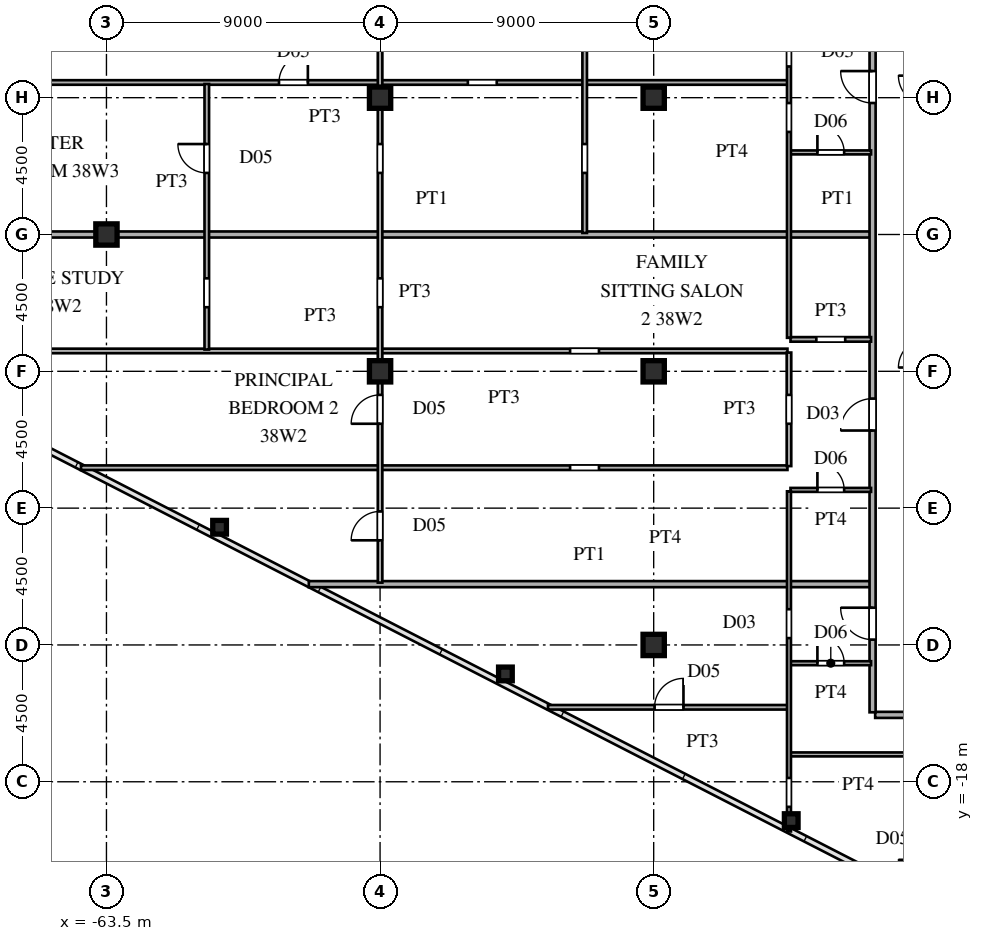
"""IFC4 building model, lengths in metres.
Left out: names, types, materials, properties, quantities, classifications, styles, units other than length and angle.
Written with IfcOpenShell. Run it as: python <this file> out.ifc"""

import sys

from ifc_helpers import new_model, si_unit, direction, frame, frame_2d, origin, origin_2d, place, context, subcontext, project, spatial, rectangle, hollow_rectangle, i_section, extrude, source, transform, mapped, element, fill, save


model = new_model("IFC4")
c1 = context("Model", 3, precision=1e-05, world=origin(), true_north=direction((0.0, 1.0)))
c2 = subcontext(c1, "Body", "Model", "MODEL_VIEW")
j1 = project(units=[si_unit("LENGTHUNIT", "METRE"), si_unit("PLANEANGLEUNIT", "RADIAN")], contexts=[c1])
p1 = place(None, origin())
s1 = spatial("IfcSite", under=j1, at=p1, CompositionType="ELEMENT")
p2 = place(p1, origin())
s2 = spatial("IfcBuilding", under=s1, at=p2, CompositionType="ELEMENT")
p3 = place(p2, frame((0.0, 0.0, 144.0)))
s3 = spatial("IfcBuildingStorey", under=s2, at=p3, CompositionType="ELEMENT", Elevation=144.0)
m1 = source(origin(), c2, "Body", "SweptSolid", [
    extrude(i_section(OverallWidth=0.7, OverallDepth=0.7, WebThickness=0.028, FlangeThickness=0.045, at=origin_2d()), origin(), (0.0, 0.0, 1.0), 3.6),
])
for number, where, z_axis, x_axis in (
    (1, (-45.5, -13.5, 0.0), (0.0, 0.0, 1.0), (1.0, 0.0, 0.0)),
    (2, (-45.5, -4.5, 0.0), (0.0, 0.0, 1.0), (1.0, 0.0, 0.0)),
    (3, (-45.5, 4.5, 0.0), (0.0, 0.0, 1.0), (1.0, 0.0, 0.0)),
    (4, (-54.5, -4.5, 0.0), (0.0, 0.0, 1.0), (1.0, 0.0, 0.0)),
    (5, (-54.5, 4.5, 0.0), (0.0, 0.0, 1.0), (1.0, 0.0, 0.0)),
    (6, (-63.5, 0.0, 0.0), (0.0, 0.0, 1.0), (1.0, 0.0, 0.0)),
):
    element("IfcColumn", number, at=place(p3, frame(where, z_axis=z_axis, x_axis=x_axis)), inside=s3, PredefinedType="COLUMN", context=c2, shape_type="MappedRepresentation", body=[
        mapped(m1, transform((0.0, 0.0, 0.0), scale=1.0)),
    ])
m2 = source(origin(), c2, "Body", "SweptSolid", [
    extrude(hollow_rectangle(XDim=0.45, YDim=0.45, WallThickness=0.018, at=origin_2d()), origin(), (0.0, 0.0, 1.0), 3.6),
])
for number, where, z_axis, x_axis in (
    (7, (-40.976, -19.278, 0.0), (0.0, 0.0, 1.0), (1.0, 0.0, 0.0)),
    (8, (-50.377, -14.453, 0.0), (0.0, 0.0, 1.0), (1.0, 0.0, 0.0)),
    (9, (-59.779, -9.629, 0.0), (0.0, 0.0, 1.0), (1.0, 0.0, 0.0)),
):
    element("IfcColumn", number, at=place(p3, frame(where, z_axis=z_axis, x_axis=x_axis)), inside=s3, PredefinedType="COLUMN", context=c2, shape_type="MappedRepresentation", body=[
        mapped(m2, transform((0.0, 0.0, 0.0), scale=1.0)),
    ])
p4 = place(p3, frame((-41.0, -17.1, 0.0), z_axis=(0.0, 0.0, 1.0), x_axis=(1.0, 0.0, 0.0)))
e10 = element("IfcWall", 10, at=p4, inside=s3, PredefinedType="PARTITIONING", context=c2, shape_type="SweptSolid", body=[
    extrude(rectangle(XDim=4.45, YDim=0.13, at=frame_2d((2.225, 0.0))), origin(), (0.0, 0.0, 1.0), 3.38),
])
p5 = place(p3, frame((-38.215, -15.8, 0.0), z_axis=(0.0, 0.0, 1.0), x_axis=(1.0, 0.0, 0.0)))
e11 = element("IfcWall", 11, at=p5, inside=s3, PredefinedType="PARTITIONING", context=c2, shape_type="SweptSolid", body=[
    extrude(rectangle(XDim=10.715, YDim=0.2, at=frame_2d((5.357, 0.0))), origin(), (0.0, 0.0, 1.0), 3.38),
])
p6 = place(p3, frame((-48.977, -15.55, 0.0), z_axis=(0.0, 0.0, 1.0), x_axis=(1.0, 0.0, 0.0)))
e12 = element("IfcWall", 12, at=p6, inside=s3, PredefinedType="PARTITIONING", context=c2, shape_type="SweptSolid", body=[
    extrude(rectangle(XDim=7.877, YDim=0.15, at=frame_2d((3.938, 0.0))), origin(), (0.0, 0.0, 1.0), 3.38),
])
p7 = place(p6, frame((3.506, 0.0, 0.0)))
e13 = element("IfcOpeningElement", 13, at=p7, cuts=e12, PredefinedType="OPENING", context=c2, shape_type="SweptSolid", body=[
    extrude(rectangle(XDim=0.95, YDim=2.15, at=frame_2d((0.475, 1.075))), frame((0.0, 0.085, 0.0), z_axis=(0.0, -1.0, 0.0), x_axis=(1.0, 0.0, 0.0)), (0.0, 0.0, 1.0), 0.17),
])
p8 = place(p3, frame((-41.0, -14.1, 0.0), z_axis=(0.0, 0.0, 1.0), x_axis=(1.0, 0.0, 0.0)))
e14 = element("IfcWall", 14, at=p8, inside=s3, PredefinedType="PARTITIONING", context=c2, shape_type="SweptSolid", body=[
    extrude(rectangle(XDim=2.65, YDim=0.13, at=frame_2d((1.325, 0.0))), origin(), (0.0, 0.0, 1.0), 3.38),
])
p9 = place(p8, frame((0.885, 0.0, 0.0)))
e15 = element("IfcOpeningElement", 15, at=p9, cuts=e14, PredefinedType="OPENING", context=c2, shape_type="SweptSolid", body=[
    extrude(rectangle(XDim=0.88, YDim=2.1, at=frame_2d((0.44, 1.05))), frame((0.0, 0.075, 0.0), z_axis=(0.0, -1.0, 0.0), x_axis=(1.0, 0.0, 0.0)), (0.0, 0.0, 1.0), 0.15),
])
p10 = place(p3, frame((-56.844, -11.5, 0.0), z_axis=(0.0, 0.0, 1.0), x_axis=(1.0, 0.0, 0.0)))
e16 = element("IfcWall", 16, at=p10, inside=s3, PredefinedType="PARTITIONING", context=c2, shape_type="SweptSolid", body=[
    extrude(rectangle(XDim=18.464, YDim=0.2, at=frame_2d((9.232, 0.0))), origin(), (0.0, 0.0, 1.0), 3.38),
])
p11 = place(p3, frame((-41.0, -8.4, 0.0), z_axis=(0.0, 0.0, 1.0), x_axis=(1.0, 0.0, 0.0)))
e17 = element("IfcWall", 17, at=p11, inside=s3, PredefinedType="PARTITIONING", context=c2, shape_type="SweptSolid", body=[
    extrude(rectangle(XDim=2.65, YDim=0.13, at=frame_2d((1.325, 0.0))), origin(), (0.0, 0.0, 1.0), 3.38),
])
p12 = place(p11, frame((0.885, 0.0, 0.0)))
e18 = element("IfcOpeningElement", 18, at=p12, cuts=e17, PredefinedType="OPENING", context=c2, shape_type="SweptSolid", body=[
    extrude(rectangle(XDim=0.88, YDim=2.1, at=frame_2d((0.44, 1.05))), frame((0.0, 0.075, 0.0), z_axis=(0.0, -1.0, 0.0), x_axis=(1.0, 0.0, 0.0)), (0.0, 0.0, 1.0), 0.15),
])
p13 = place(p3, frame((-64.338, -7.67, 0.0), z_axis=(0.0, 0.0, 1.0), x_axis=(1.0, 0.0, 0.0)))
e19 = element("IfcWall", 19, at=p13, inside=s3, PredefinedType="PARTITIONING", context=c2, shape_type="SweptSolid", body=[
    extrude(rectangle(XDim=23.238, YDim=0.15, at=frame_2d((11.619, 0.0))), origin(), (0.0, 0.0, 1.0), 3.38),
])
p14 = place(p13, frame((16.088, 0.0, 0.0)))
e20 = element("IfcOpeningElement", 20, at=p14, cuts=e19, PredefinedType="OPENING", context=c2, shape_type="SweptSolid", body=[
    extrude(rectangle(XDim=0.95, YDim=2.15, at=frame_2d((0.475, 1.075))), frame((0.0, 0.085, 0.0), z_axis=(0.0, -1.0, 0.0), x_axis=(1.0, 0.0, 0.0)), (0.0, 0.0, 1.0), 0.17),
])
p15 = place(p3, frame((-69.535, -3.83, 0.0), z_axis=(0.0, 0.0, 1.0), x_axis=(1.0, 0.0, 0.0)))
e21 = element("IfcWall", 21, at=p15, inside=s3, PredefinedType="PARTITIONING", context=c2, shape_type="SweptSolid", body=[
    extrude(rectangle(XDim=28.435, YDim=0.15, at=frame_2d((14.217, 0.0))), origin(), (0.0, 0.0, 1.0), 3.38),
])
p16 = place(p15, frame((21.285, 0.0, 0.0)))
e22 = element("IfcOpeningElement", 22, at=p16, cuts=e21, PredefinedType="OPENING", context=c2, shape_type="SweptSolid", body=[
    extrude(rectangle(XDim=0.95, YDim=2.15, at=frame_2d((0.475, 1.075))), frame((0.0, 0.085, 0.0), z_axis=(0.0, -1.0, 0.0), x_axis=(1.0, 0.0, 0.0)), (0.0, 0.0, 1.0), 0.17),
])
p17 = place(p3, frame((-41.0, -3.45, 0.0), z_axis=(0.0, 0.0, 1.0), x_axis=(1.0, 0.0, 0.0)))
e23 = element("IfcWall", 23, at=p17, inside=s3, PredefinedType="PARTITIONING", context=c2, shape_type="SweptSolid", body=[
    extrude(rectangle(XDim=2.65, YDim=0.15, at=frame_2d((1.325, 0.0))), origin(), (0.0, 0.0, 1.0), 3.38),
])
p18 = place(p17, frame((0.85, 0.0, 0.0)))
e24 = element("IfcOpeningElement", 24, at=p18, cuts=e23, PredefinedType="OPENING", context=c2, shape_type="SweptSolid", body=[
    extrude(rectangle(XDim=0.95, YDim=2.15, at=frame_2d((0.475, 1.075))), frame((0.0, 0.085, 0.0), z_axis=(0.0, -1.0, 0.0), x_axis=(1.0, 0.0, 0.0)), (0.0, 0.0, 1.0), 0.17),
])
p19 = place(p3, frame((-69.505, 0.0, 0.0), z_axis=(0.0, 0.0, 1.0), x_axis=(1.0, 0.0, 0.0)))
e25 = element("IfcWall", 25, at=p19, inside=s3, PredefinedType="PARTITIONING", context=c2, shape_type="SweptSolid", body=[
    extrude(rectangle(XDim=31.125, YDim=0.2, at=frame_2d((15.562, 0.0))), origin(), (0.0, 0.0, 1.0), 3.38),
])
p20 = place(p3, frame((-41.0, 2.7, 0.0), z_axis=(0.0, 0.0, 1.0), x_axis=(1.0, 0.0, 0.0)))
e26 = element("IfcWall", 26, at=p20, inside=s3, PredefinedType="PARTITIONING", context=c2, shape_type="SweptSolid", body=[
    extrude(rectangle(XDim=2.65, YDim=0.13, at=frame_2d((1.325, 0.0))), origin(), (0.0, 0.0, 1.0), 3.38),
])
p21 = place(p20, frame((0.885, 0.0, 0.0)))
e27 = element("IfcOpeningElement", 27, at=p21, cuts=e26, PredefinedType="OPENING", context=c2, shape_type="SweptSolid", body=[
    extrude(rectangle(XDim=0.88, YDim=2.1, at=frame_2d((0.44, 1.05))), frame((0.0, 0.075, 0.0), z_axis=(0.0, -1.0, 0.0), x_axis=(1.0, 0.0, 0.0)), (0.0, 0.0, 1.0), 0.15),
])
p22 = place(p3, frame((-69.226, 5.0, 0.0), z_axis=(0.0, 0.0, 1.0), x_axis=(1.0, 0.0, 0.0)))
e28 = element("IfcWall", 28, at=p22, inside=s3, PredefinedType="PARTITIONING", context=c2, shape_type="SweptSolid", body=[
    extrude(rectangle(XDim=28.126, YDim=0.15, at=frame_2d((14.063, 0.0))), origin(), (0.0, 0.0, 1.0), 3.38),
])
p23 = place(p22, frame((11.401, 0.0, 0.0)))
e29 = element("IfcOpeningElement", 29, at=p23, cuts=e28, PredefinedType="OPENING", context=c2, shape_type="SweptSolid", body=[
    extrude(rectangle(XDim=0.95, YDim=2.15, at=frame_2d((0.475, 1.075))), frame((0.0, 0.085, 0.0), z_axis=(0.0, -1.0, 0.0), x_axis=(1.0, 0.0, 0.0)), (0.0, 0.0, 1.0), 0.17),
])
p24 = place(p22, frame((17.614, 0.0, 0.0)))
e30 = element("IfcOpeningElement", 30, at=p24, cuts=e28, PredefinedType="OPENING", context=c2, shape_type="SweptSolid", body=[
    extrude(rectangle(XDim=0.95, YDim=2.15, at=frame_2d((0.475, 1.075))), frame((0.0, 0.085, 0.0), z_axis=(0.0, -1.0, 0.0), x_axis=(1.0, 0.0, 0.0)), (0.0, 0.0, 1.0), 0.17),
])
p25 = place(p3, frame((-60.2, -3.783, 0.0), z_axis=(0.0, 0.0, 1.0), x_axis=(0.0, 1.0, 0.0)))
e31 = element("IfcWall", 31, at=p25, inside=s3, PredefinedType="PARTITIONING", context=c2, shape_type="SweptSolid", body=[
    extrude(rectangle(XDim=8.733, YDim=0.15, at=frame_2d((4.366, 0.0))), origin(), (0.0, 0.0, 1.0), 3.38),
])
p26 = place(p25, frame((1.391, 0.0, 0.0)))
e32 = element("IfcOpeningElement", 32, at=p26, cuts=e31, PredefinedType="OPENING", context=c2, shape_type="SweptSolid", body=[
    extrude(rectangle(XDim=0.95, YDim=2.15, at=frame_2d((0.475, 1.075))), frame((0.0, 0.085, 0.0), z_axis=(0.0, -1.0, 0.0), x_axis=(1.0, 0.0, 0.0)), (0.0, 0.0, 1.0), 0.17),
])
p27 = place(p25, frame((5.808, 0.0, 0.0)))
e33 = element("IfcOpeningElement", 33, at=p27, cuts=e31, PredefinedType="OPENING", context=c2, shape_type="SweptSolid", body=[
    extrude(rectangle(XDim=0.95, YDim=2.15, at=frame_2d((0.475, 1.075))), frame((0.0, 0.085, 0.0), z_axis=(0.0, -1.0, 0.0), x_axis=(1.0, 0.0, 0.0)), (0.0, 0.0, 1.0), 0.17),
])
p28 = place(p3, frame((-54.5, -11.45, 0.0), z_axis=(0.0, 0.0, 1.0), x_axis=(0.0, 1.0, 0.0)))
e34 = element("IfcWall", 34, at=p28, inside=s3, PredefinedType="PARTITIONING", context=c2, shape_type="SweptSolid", body=[
    extrude(rectangle(XDim=21.4, YDim=0.15, at=frame_2d((10.7, 0.0))), origin(), (0.0, 0.0, 1.0), 2.78),
])
p29 = place(p28, frame((5.225, 0.0, 0.0)))
e35 = element("IfcOpeningElement", 35, at=p29, cuts=e34, PredefinedType="OPENING", context=c2, shape_type="SweptSolid", body=[
    extrude(rectangle(XDim=0.95, YDim=2.15, at=frame_2d((0.475, 1.075))), frame((0.0, 0.085, 0.0), z_axis=(0.0, -1.0, 0.0), x_axis=(1.0, 0.0, 0.0)), (0.0, 0.0, 1.0), 0.17),
])
p30 = place(p28, frame((1.392, 0.0, 0.0)))
e36 = element("IfcOpeningElement", 36, at=p30, cuts=e34, PredefinedType="OPENING", context=c2, shape_type="SweptSolid", body=[
    extrude(rectangle(XDim=0.95, YDim=2.15, at=frame_2d((0.475, 1.075))), frame((0.0, 0.085, 0.0), z_axis=(0.0, -1.0, 0.0), x_axis=(1.0, 0.0, 0.0)), (0.0, 0.0, 1.0), 0.17),
])
p31 = place(p28, frame((9.058, 0.0, 0.0)))
e37 = element("IfcOpeningElement", 37, at=p31, cuts=e34, PredefinedType="OPENING", context=c2, shape_type="SweptSolid", body=[
    extrude(rectangle(XDim=0.95, YDim=2.15, at=frame_2d((0.475, 1.075))), frame((0.0, 0.085, 0.0), z_axis=(0.0, -1.0, 0.0), x_axis=(1.0, 0.0, 0.0)), (0.0, 0.0, 1.0), 0.17),
])
p32 = place(p28, frame((13.475, 0.0, 0.0)))
e38 = element("IfcOpeningElement", 38, at=p32, cuts=e34, PredefinedType="OPENING", context=c2, shape_type="SweptSolid", body=[
    extrude(rectangle(XDim=0.95, YDim=2.15, at=frame_2d((0.475, 1.075))), frame((0.0, 0.085, 0.0), z_axis=(0.0, -1.0, 0.0), x_axis=(1.0, 0.0, 0.0)), (0.0, 0.0, 1.0), 0.17),
])
p33 = place(p3, frame((-47.77, 0.05, 0.0), z_axis=(0.0, 0.0, 1.0), x_axis=(0.0, 1.0, 0.0)))
e39 = element("IfcWall", 39, at=p33, inside=s3, PredefinedType="PARTITIONING", context=c2, shape_type="SweptSolid", body=[
    extrude(rectangle(XDim=14.7, YDim=0.15, at=frame_2d((7.35, 0.0))), origin(), (0.0, 0.0, 1.0), 3.38),
])
p34 = place(p33, frame((1.975, 0.0, 0.0)))
e40 = element("IfcOpeningElement", 40, at=p34, cuts=e39, PredefinedType="OPENING", context=c2, shape_type="SweptSolid", body=[
    extrude(rectangle(XDim=0.95, YDim=2.15, at=frame_2d((0.475, 1.075))), frame((0.0, 0.085, 0.0), z_axis=(0.0, -1.0, 0.0), x_axis=(1.0, 0.0, 0.0)), (0.0, 0.0, 1.0), 0.17),
])
p35 = place(p33, frame((11.875, 0.0, 0.0)))
e41 = element("IfcOpeningElement", 41, at=p35, cuts=e39, PredefinedType="OPENING", context=c2, shape_type="SweptSolid", body=[
    extrude(rectangle(XDim=0.95, YDim=2.15, at=frame_2d((0.475, 1.075))), frame((0.0, 0.085, 0.0), z_axis=(0.0, -1.0, 0.0), x_axis=(1.0, 0.0, 0.0)), (0.0, 0.0, 1.0), 0.17),
])
p36 = place(p3, frame((-41.05, -19.634, 0.0), z_axis=(0.0, 0.0, 1.0), x_axis=(0.0, 1.0, 0.0)))
e42 = element("IfcWall", 42, at=p36, inside=s3, PredefinedType="PARTITIONING", context=c2, shape_type="SweptSolid", body=[
    extrude(rectangle(XDim=11.187, YDim=0.13, at=frame_2d((5.594, 0.0))), origin(), (0.0, 0.0, 1.0), 2.99),
])
p37 = place(p36, frame((6.359, 0.0, 0.0)))
e43 = element("IfcOpeningElement", 43, at=p37, cuts=e42, PredefinedType="OPENING", context=c2, shape_type="SweptSolid", body=[
    extrude(rectangle(XDim=0.95, YDim=2.15, at=frame_2d((0.475, 1.075))), frame((0.0, 0.075, 0.0), z_axis=(0.0, -1.0, 0.0), x_axis=(1.0, 0.0, 0.0)), (0.0, 0.0, 1.0), 0.15),
])
p38 = place(p36, frame((0.809, 0.0, 0.0)))
e44 = element("IfcOpeningElement", 44, at=p38, cuts=e42, PredefinedType="OPENING", context=c2, shape_type="SweptSolid", body=[
    extrude(rectangle(XDim=0.95, YDim=2.15, at=frame_2d((0.475, 1.075))), frame((0.0, 0.075, 0.0), z_axis=(0.0, -1.0, 0.0), x_axis=(1.0, 0.0, 0.0)), (0.0, 0.0, 1.0), 0.15),
])
p39 = place(p3, frame((-41.05, -7.617, 0.0), z_axis=(0.0, 0.0, 1.0), x_axis=(0.0, 1.0, 0.0)))
e45 = element("IfcWall", 45, at=p39, inside=s3, PredefinedType="PARTITIONING", context=c2, shape_type="SweptSolid", body=[
    extrude(rectangle(XDim=3.734, YDim=0.15, at=frame_2d((1.867, 0.0))), origin(), (0.0, 0.0, 1.0), 2.99),
])
p40 = place(p39, frame((1.392, 0.0, 0.0)))
e46 = element("IfcOpeningElement", 46, at=p40, cuts=e45, PredefinedType="OPENING", context=c2, shape_type="SweptSolid", body=[
    extrude(rectangle(XDim=0.95, YDim=2.15, at=frame_2d((0.475, 1.075))), frame((0.0, 0.085, 0.0), z_axis=(0.0, -1.0, 0.0), x_axis=(1.0, 0.0, 0.0)), (0.0, 0.0, 1.0), 0.17),
])
p41 = place(p3, frame((-41.05, -3.398, 0.0), z_axis=(0.0, 0.0, 1.0), x_axis=(0.0, 1.0, 0.0)))
e47 = element("IfcWall", 47, at=p41, inside=s3, PredefinedType="PARTITIONING", context=c2, shape_type="SweptSolid", body=[
    extrude(rectangle(XDim=23.032, YDim=0.13, at=frame_2d((11.516, 0.0))), origin(), (0.0, 0.0, 1.0), 2.99),
])
p42 = place(p41, frame((6.772, 0.0, 0.0)))
e48 = element("IfcOpeningElement", 48, at=p42, cuts=e47, PredefinedType="OPENING", context=c2, shape_type="SweptSolid", body=[
    extrude(rectangle(XDim=0.95, YDim=2.15, at=frame_2d((0.475, 1.075))), frame((0.0, 0.075, 0.0), z_axis=(0.0, -1.0, 0.0), x_axis=(1.0, 0.0, 0.0)), (0.0, 0.0, 1.0), 0.15),
])
p43 = place(p41, frame((8.924, 0.0, 0.0)))
e49 = element("IfcOpeningElement", 49, at=p43, cuts=e47, PredefinedType="OPENING", context=c2, shape_type="SweptSolid", body=[
    extrude(rectangle(XDim=0.95, YDim=2.15, at=frame_2d((0.475, 1.075))), frame((0.0, 0.075, 0.0), z_axis=(0.0, -1.0, 0.0), x_axis=(1.0, 0.0, 0.0)), (0.0, 0.0, 1.0), 0.15),
])
p44 = place(p41, frame((14.321, 0.0, 0.0)))
e50 = element("IfcOpeningElement", 50, at=p44, cuts=e47, PredefinedType="OPENING", context=c2, shape_type="SweptSolid", body=[
    extrude(rectangle(XDim=0.95, YDim=2.15, at=frame_2d((0.475, 1.075))), frame((0.0, 0.075, 0.0), z_axis=(0.0, -1.0, 0.0), x_axis=(1.0, 0.0, 0.0)), (0.0, 0.0, 1.0), 0.15),
])
p45 = place(p41, frame((21.273, 0.0, 0.0)))
e51 = element("IfcOpeningElement", 51, at=p45, cuts=e47, PredefinedType="OPENING", context=c2, shape_type="SweptSolid", body=[
    extrude(rectangle(XDim=0.95, YDim=2.15, at=frame_2d((0.475, 1.075))), frame((0.0, 0.075, 0.0), z_axis=(0.0, -1.0, 0.0), x_axis=(1.0, 0.0, 0.0)), (0.0, 0.0, 1.0), 0.15),
])
p46 = place(p3, frame((-38.3, -15.715, 0.0), z_axis=(0.0, 0.0, 1.0), x_axis=(0.0, 1.0, 0.0)))
e52 = element("IfcWall", 52, at=p46, inside=s3, PredefinedType="PARTITIONING", context=c2, shape_type="SweptSolid", body=[
    extrude(rectangle(XDim=31.43, YDim=0.2, at=frame_2d((15.715, 0.0))), origin(), (0.0, 0.0, 1.0), 3.38),
])
p47 = place(p46, frame((2.39, 0.0, 0.0)))
e53 = element("IfcOpeningElement", 53, at=p47, cuts=e52, PredefinedType="OPENING", context=c2, shape_type="SweptSolid", body=[
    extrude(rectangle(XDim=1.05, YDim=2.25, at=frame_2d((0.525, 1.125))), frame((0.0, 0.11, 0.0), z_axis=(0.0, -1.0, 0.0), x_axis=(1.0, 0.0, 0.0)), (0.0, 0.0, 1.0), 0.22),
])
p48 = place(p46, frame((9.268, 0.0, 0.0)))
e54 = element("IfcOpeningElement", 54, at=p48, cuts=e52, PredefinedType="OPENING", context=c2, shape_type="SweptSolid", body=[
    extrude(rectangle(XDim=1.05, YDim=2.25, at=frame_2d((0.525, 1.125))), frame((0.0, 0.11, 0.0), z_axis=(0.0, -1.0, 0.0), x_axis=(1.0, 0.0, 0.0)), (0.0, 0.0, 1.0), 0.22),
])
p49 = place(p46, frame((20.04, 0.0, 0.0)))
e55 = element("IfcOpeningElement", 55, at=p49, cuts=e52, PredefinedType="OPENING", context=c2, shape_type="SweptSolid", body=[
    extrude(rectangle(XDim=1.05, YDim=2.25, at=frame_2d((0.525, 1.125))), frame((0.0, 0.11, 0.0), z_axis=(0.0, -1.0, 0.0), x_axis=(1.0, 0.0, 0.0)), (0.0, 0.0, 1.0), 0.22),
])
p50 = place(p46, frame((26.587, 0.0, 0.0)))
e56 = element("IfcOpeningElement", 56, at=p50, cuts=e52, PredefinedType="OPENING", context=c2, shape_type="SweptSolid", body=[
    extrude(rectangle(XDim=1.05, YDim=2.25, at=frame_2d((0.525, 1.125))), frame((0.0, 0.11, 0.0), z_axis=(0.0, -1.0, 0.0), x_axis=(1.0, 0.0, 0.0)), (0.0, 0.0, 1.0), 0.22),
])
m3 = source(origin(), c2, "Body", "SweptSolid", [
    extrude(rectangle(XDim=0.95, YDim=2.15, at=frame_2d((0.475, 1.075))), frame((0.0, 0.025, 0.0), z_axis=(0.0, -1.0, 0.0), x_axis=(1.0, 0.0, 0.0)), (0.0, 0.0, 1.0), 0.05),
])
p51 = place(p7, origin())
e57 = element("IfcDoor", 57, at=p51, inside=s3, OperationType="SINGLE_SWING_RIGHT", PredefinedType="DOOR", context=c2, shape_type="MappedRepresentation", body=[
    mapped(m3, transform((0.0, 0.0, 0.0), scale=1.0)),
])
fill(e13, e57)
m4 = source(origin(), c2, "Body", "SweptSolid", [
    extrude(rectangle(XDim=0.88, YDim=2.1, at=frame_2d((0.44, 1.05))), frame((0.0, 0.025, 0.0), z_axis=(0.0, -1.0, 0.0), x_axis=(1.0, 0.0, 0.0)), (0.0, 0.0, 1.0), 0.05),
])
p52 = place(p9, origin())
e58 = element("IfcDoor", 58, at=p52, inside=s3, OperationType="SINGLE_SWING_LEFT", PredefinedType="DOOR", context=c2, shape_type="MappedRepresentation", body=[
    mapped(m4, transform((0.0, 0.0, 0.0), scale=1.0)),
])
fill(e15, e58)
p53 = place(p12, origin())
e59 = element("IfcDoor", 59, at=p53, inside=s3, OperationType="SINGLE_SWING_LEFT", PredefinedType="DOOR", context=c2, shape_type="MappedRepresentation", body=[
    mapped(m4, transform((0.0, 0.0, 0.0), scale=1.0)),
])
fill(e18, e59)
p54 = place(p21, origin())
e60 = element("IfcDoor", 60, at=p54, inside=s3, OperationType="SINGLE_SWING_LEFT", PredefinedType="DOOR", context=c2, shape_type="MappedRepresentation", body=[
    mapped(m4, transform((0.0, 0.0, 0.0), scale=1.0)),
])
fill(e27, e60)
p55 = place(p23, origin())
e61 = element("IfcDoor", 61, at=p55, inside=s3, OperationType="SINGLE_SWING_RIGHT", PredefinedType="DOOR", context=c2, shape_type="MappedRepresentation", body=[
    mapped(m3, transform((0.0, 0.0, 0.0), scale=1.0)),
])
fill(e29, e61)
p56 = place(p27, origin())
e62 = element("IfcDoor", 62, at=p56, inside=s3, OperationType="SINGLE_SWING_RIGHT", PredefinedType="DOOR", context=c2, shape_type="MappedRepresentation", body=[
    mapped(m3, transform((0.0, 0.0, 0.0), scale=1.0)),
])
fill(e33, e62)
p57 = place(p29, origin())
e63 = element("IfcDoor", 63, at=p57, inside=s3, OperationType="SINGLE_SWING_LEFT", PredefinedType="DOOR", context=c2, shape_type="MappedRepresentation", body=[
    mapped(m3, transform((0.0, 0.0, 0.0), scale=1.0)),
])
fill(e35, e63)
p58 = place(p30, origin())
e64 = element("IfcDoor", 64, at=p58, inside=s3, OperationType="SINGLE_SWING_LEFT", PredefinedType="DOOR", context=c2, shape_type="MappedRepresentation", body=[
    mapped(m3, transform((0.0, 0.0, 0.0), scale=1.0)),
])
fill(e36, e64)
m5 = source(origin(), c2, "Body", "SweptSolid", [
    extrude(rectangle(XDim=1.05, YDim=2.25, at=frame_2d((0.525, 1.125))), frame((0.0, 0.025, 0.0), z_axis=(0.0, -1.0, 0.0), x_axis=(1.0, 0.0, 0.0)), (0.0, 0.0, 1.0), 0.05),
])
p59 = place(p47, origin())
e65 = element("IfcDoor", 65, at=p59, inside=s3, OperationType="SINGLE_SWING_RIGHT", PredefinedType="DOOR", context=c2, shape_type="MappedRepresentation", body=[
    mapped(m5, transform((0.0, 0.0, 0.0), scale=1.0)),
])
fill(e53, e65)
p60 = place(p48, origin())
e66 = element("IfcDoor", 66, at=p60, inside=s3, OperationType="SINGLE_SWING_LEFT", PredefinedType="DOOR", context=c2, shape_type="MappedRepresentation", body=[
    mapped(m5, transform((0.0, 0.0, 0.0), scale=1.0)),
])
fill(e54, e66)
p61 = place(p49, origin())
e67 = element("IfcDoor", 67, at=p61, inside=s3, OperationType="SINGLE_SWING_RIGHT", PredefinedType="DOOR", context=c2, shape_type="MappedRepresentation", body=[
    mapped(m5, transform((0.0, 0.0, 0.0), scale=1.0)),
])
fill(e55, e67)
save(model, sys.argv[1])
